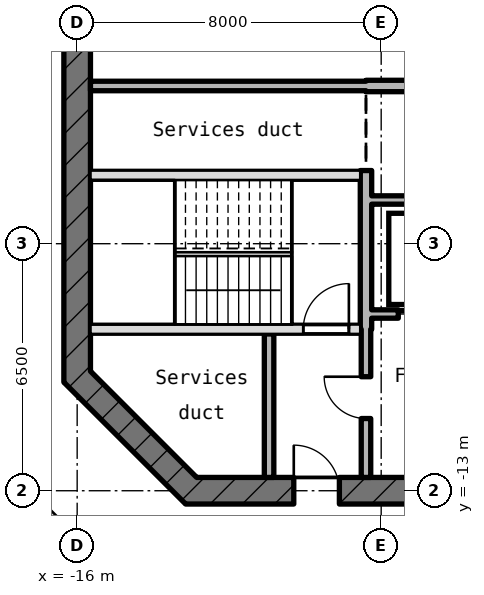
"""IFC4 building model, lengths in metres.
Left out: names, types, materials, properties, quantities, classifications, styles, units other than length and angle.
Written with IfcOpenShell. Run it as: python <this file> out.ifc"""

import sys

from ifc_helpers import new_model, si_unit, direction, frame, frame_2d, origin, place, context, subcontext, project, spatial, rectangle, extrude, element, fill, save


model = new_model("IFC4")
c1 = context("Model", 3, precision=1e-05, world=origin(), true_north=direction((0.0, 1.0)))
c2 = subcontext(c1, "Body", "Model", "MODEL_VIEW")
j1 = project(units=[si_unit("LENGTHUNIT", "METRE"), si_unit("PLANEANGLEUNIT", "RADIAN")], contexts=[c1])
p1 = place(None, origin())
s1 = spatial("IfcSite", under=j1, at=p1, CompositionType="ELEMENT")
p2 = place(p1, origin())
s2 = spatial("IfcBuilding", under=s1, at=p2, CompositionType="ELEMENT")
p3 = place(p2, frame((0.0, 0.0, 371.65)))
s3 = spatial("IfcBuildingStorey", under=s2, at=p3, CompositionType="ELEMENT", Elevation=371.65)
p4 = place(p3, frame((-16.0, 10.145, -0.18), z_axis=(0.0, 0.0, 1.0), x_axis=(0.0, -1.0, 0.0)))
e1 = element("IfcWall", 1, at=p4, inside=s3, PredefinedType="SHEAR", context=c2, shape_type="SweptSolid", body=[
    extrude(rectangle(XDim=20.29, YDim=0.7, at=frame_2d((10.145, 0.0))), origin(), (0.0, 0.0, 1.0), 4.15),
])
p5 = place(p4, frame((8.945, 0.0, 0.18)))
e2 = element("IfcOpeningElement", 2, at=p5, cuts=e1, PredefinedType="OPENING", context=c2, shape_type="SweptSolid", body=[
    extrude(rectangle(XDim=2.4, YDim=2.1, at=frame_2d((1.2, 1.05))), frame((0.0, 0.36, 0.0), z_axis=(0.0, -1.0, 0.0), x_axis=(1.0, 0.0, 0.0)), (0.0, 0.0, 1.0), 0.72),
])
p6 = place(p4, frame((5.545, 0.0, 0.18)))
e3 = element("IfcOpeningElement", 3, at=p6, cuts=e1, PredefinedType="OPENING", context=c2, shape_type="SweptSolid", body=[
    extrude(rectangle(XDim=1.2, YDim=2.1, at=frame_2d((0.6, 1.05))), frame((0.0, 0.36, 0.0), z_axis=(0.0, -1.0, 0.0), x_axis=(1.0, 0.0, 0.0)), (0.0, 0.0, 1.0), 0.72),
])
p7 = place(p3, frame((-16.103, -9.897, -0.18), z_axis=(0.0, 0.0, 1.0), x_axis=(0.707106781187, -0.707106781187, 0.0)))
e4 = element("IfcWall", 4, at=p7, inside=s3, PredefinedType="SHEAR", context=c2, shape_type="SweptSolid", body=[
    extrude(rectangle(XDim=4.533, YDim=0.7, at=frame_2d((2.266, 0.0))), origin(), (0.0, 0.0, 1.0), 4.15),
])
p8 = place(p3, frame((-13.145, -13.0, -0.18), z_axis=(0.0, 0.0, 1.0), x_axis=(1.0, 0.0, 0.0)))
e5 = element("IfcWall", 5, at=p8, inside=s3, PredefinedType="SHEAR", context=c2, shape_type="SweptSolid", body=[
    extrude(rectangle(XDim=26.29, YDim=0.7, at=frame_2d((13.145, 0.0))), origin(), (0.0, 0.0, 1.0), 4.15),
])
p9 = place(p8, frame((2.845, 0.0, 0.18)))
e6 = element("IfcOpeningElement", 6, at=p9, cuts=e5, PredefinedType="OPENING", context=c2, shape_type="SweptSolid", body=[
    extrude(rectangle(XDim=1.2, YDim=2.1, at=frame_2d((0.6, 1.05))), frame((0.0, 0.36, 0.0), z_axis=(0.0, -1.0, 0.0), x_axis=(1.0, 0.0, 0.0)), (0.0, 0.0, 1.0), 0.72),
])
p10 = place(p8, frame((6.845, 0.0, 0.18)))
e7 = element("IfcOpeningElement", 7, at=p10, cuts=e5, PredefinedType="OPENING", context=c2, shape_type="SweptSolid", body=[
    extrude(rectangle(XDim=1.4, YDim=2.1, at=frame_2d((0.7, 1.05))), frame((0.0, 0.36, 0.0), z_axis=(0.0, -1.0, 0.0), x_axis=(1.0, 0.0, 0.0)), (0.0, 0.0, 1.0), 0.72),
])
p11 = place(p8, frame((15.445, 0.0, 0.18)))
e8 = element("IfcOpeningElement", 8, at=p11, cuts=e5, PredefinedType="OPENING", context=c2, shape_type="SweptSolid", body=[
    extrude(rectangle(XDim=1.4, YDim=2.1, at=frame_2d((0.7, 1.05))), frame((0.0, 0.36, 0.0), z_axis=(0.0, -1.0, 0.0), x_axis=(1.0, 0.0, 0.0)), (0.0, 0.0, 1.0), 0.72),
])
p12 = place(p3, frame((-15.65, -8.75, -0.18), z_axis=(0.0, 0.0, 1.0), x_axis=(1.0, 0.0, 0.0)))
e9 = element("IfcWall", 9, at=p12, inside=s3, PredefinedType="SHEAR", context=c2, shape_type="SweptSolid", body=[
    extrude(rectangle(XDim=7.1, YDim=0.25, at=frame_2d((3.55, 0.0))), origin(), (0.0, 0.0, 1.0), 4.15),
])
p13 = place(p12, frame((5.6, 0.0, 0.18)))
e10 = element("IfcOpeningElement", 10, at=p13, cuts=e9, PredefinedType="OPENING", context=c2, shape_type="SweptSolid", body=[
    extrude(rectangle(XDim=1.2, YDim=2.1, at=frame_2d((0.6, 1.05))), frame((0.0, 0.135, 0.0), z_axis=(0.0, -1.0, 0.0), x_axis=(1.0, 0.0, 0.0)), (0.0, 0.0, 1.0), 0.27),
])
p14 = place(p3, frame((-8.25, -8.35, 0.0), z_axis=(0.0, 0.0, 1.0), x_axis=(1.0, 0.0, 0.0)))
e11 = element("IfcWall", 11, at=p14, inside=s3, PredefinedType="STANDARD", context=c2, shape_type="SweptSolid", body=[
    extrude(rectangle(XDim=5.34, YDim=0.22, at=frame_2d((2.67, 0.0))), origin(), (0.0, 0.0, 1.0), 3.97),
])
p15 = place(p14, frame((0.7, 0.0, 0.0)))
e12 = element("IfcOpeningElement", 12, at=p15, cuts=e11, PredefinedType="OPENING", context=c2, shape_type="SweptSolid", body=[
    extrude(rectangle(XDim=1.1, YDim=2.1, at=frame_2d((0.55, 1.05))), frame((0.0, 0.12, 0.0), z_axis=(0.0, -1.0, 0.0), x_axis=(1.0, 0.0, 0.0)), (0.0, 0.0, 1.0), 0.24),
])
p16 = place(p14, frame((3.5, 0.0, 0.0)))
e13 = element("IfcOpeningElement", 13, at=p16, cuts=e11, PredefinedType="OPENING", context=c2, shape_type="SweptSolid", body=[
    extrude(rectangle(XDim=1.1, YDim=2.1, at=frame_2d((0.55, 1.05))), frame((0.0, 0.12, 0.0), z_axis=(0.0, -1.0, 0.0), x_axis=(1.0, 0.0, 0.0)), (0.0, 0.0, 1.0), 0.24),
])
p17 = place(p3, frame((-8.25, -5.35, 0.0), z_axis=(0.0, 0.0, 1.0), x_axis=(1.0, 0.0, 0.0)))
e14 = element("IfcWall", 14, at=p17, inside=s3, PredefinedType="STANDARD", context=c2, shape_type="SweptSolid", body=[
    extrude(rectangle(XDim=16.5, YDim=0.22, at=frame_2d((8.25, 0.0))), origin(), (0.0, 0.0, 1.0), 3.97),
])
p18 = place(p3, frame((-15.65, -4.7, -0.18), z_axis=(0.0, 0.0, 1.0), x_axis=(1.0, 0.0, 0.0)))
e15 = element("IfcWall", 15, at=p18, inside=s3, PredefinedType="SHEAR", context=c2, shape_type="SweptSolid", body=[
    extrude(rectangle(XDim=7.1, YDim=0.25, at=frame_2d((3.55, 0.0))), origin(), (0.0, 0.0, 1.0), 4.15),
])
p19 = place(p3, frame((-15.65, -2.35, 0.0), z_axis=(0.0, 0.0, 1.0), x_axis=(1.0, 0.0, 0.0)))
e16 = element("IfcWall", 16, at=p19, inside=s3, PredefinedType="STANDARD", context=c2, shape_type="SweptSolid", body=[
    extrude(rectangle(XDim=7.25, YDim=0.25, at=frame_2d((3.625, 0.0))), origin(), (0.0, 0.0, 1.0), 3.97),
])
p20 = place(p3, frame((-8.4, -2.35, -0.18), z_axis=(0.0, 0.0, 1.0), x_axis=(1.0, 0.0, 0.0)))
e17 = element("IfcWall", 17, at=p20, inside=s3, PredefinedType="SHEAR", context=c2, shape_type="SweptSolid", body=[
    extrude(rectangle(XDim=16.8, YDim=0.3, at=frame_2d((8.4, 0.0))), origin(), (0.0, 0.0, 1.0), 4.15),
])
p21 = place(p20, frame((2.2, 0.0, 0.18)))
e18 = element("IfcOpeningElement", 18, at=p21, cuts=e17, PredefinedType="OPENING", context=c2, shape_type="SweptSolid", body=[
    extrude(rectangle(XDim=1.2, YDim=2.1, at=frame_2d((0.6, 1.05))), frame((0.0, 0.16, 0.0), z_axis=(0.0, -1.0, 0.0), x_axis=(1.0, 0.0, 0.0)), (0.0, 0.0, 1.0), 0.32),
])
p22 = place(p20, frame((5.0, 0.0, 0.18)))
e19 = element("IfcOpeningElement", 19, at=p22, cuts=e17, PredefinedType="OPENING", context=c2, shape_type="SweptSolid", body=[
    extrude(rectangle(XDim=1.2, YDim=2.1, at=frame_2d((0.6, 1.05))), frame((0.0, 0.16, 0.0), z_axis=(0.0, -1.0, 0.0), x_axis=(1.0, 0.0, 0.0)), (0.0, 0.0, 1.0), 0.32),
])
p23 = place(p20, frame((7.8, 0.0, 0.18)))
e20 = element("IfcOpeningElement", 20, at=p23, cuts=e17, PredefinedType="OPENING", context=c2, shape_type="SweptSolid", body=[
    extrude(rectangle(XDim=1.2, YDim=2.1, at=frame_2d((0.6, 1.05))), frame((0.0, 0.16, 0.0), z_axis=(0.0, -1.0, 0.0), x_axis=(1.0, 0.0, 0.0)), (0.0, 0.0, 1.0), 0.32),
])
p24 = place(p20, frame((10.6, 0.0, 0.18)))
e21 = element("IfcOpeningElement", 21, at=p24, cuts=e17, PredefinedType="OPENING", context=c2, shape_type="SweptSolid", body=[
    extrude(rectangle(XDim=1.2, YDim=2.1, at=frame_2d((0.6, 1.05))), frame((0.0, 0.16, 0.0), z_axis=(0.0, -1.0, 0.0), x_axis=(1.0, 0.0, 0.0)), (0.0, 0.0, 1.0), 0.32),
])
p25 = place(p20, frame((13.4, 0.0, 0.18)))
e22 = element("IfcOpeningElement", 22, at=p25, cuts=e17, PredefinedType="OPENING", context=c2, shape_type="SweptSolid", body=[
    extrude(rectangle(XDim=1.2, YDim=2.1, at=frame_2d((0.6, 1.05))), frame((0.0, 0.16, 0.0), z_axis=(0.0, -1.0, 0.0), x_axis=(1.0, 0.0, 0.0)), (0.0, 0.0, 1.0), 0.32),
])
p26 = place(p3, frame((-10.95, -12.65, 0.0), z_axis=(0.0, 0.0, 1.0), x_axis=(0.0, 1.0, 0.0)))
e23 = element("IfcWall", 23, at=p26, inside=s3, PredefinedType="STANDARD", context=c2, shape_type="SweptSolid", body=[
    extrude(rectangle(XDim=3.775, YDim=0.25, at=frame_2d((1.887, 0.0))), origin(), (0.0, 0.0, 1.0), 3.97),
])
p27 = place(p3, frame((-8.4, -12.65, 0.0), z_axis=(0.0, 0.0, 1.0), x_axis=(0.0, 1.0, 0.0)))
e24 = element("IfcWall", 24, at=p27, inside=s3, PredefinedType="STANDARD", context=c2, shape_type="SweptSolid", body=[
    extrude(rectangle(XDim=3.9, YDim=0.25, at=frame_2d((1.95, 0.0))), origin(), (0.0, 0.0, 1.0), 3.97),
])
p28 = place(p27, frame((1.55, 0.0, 0.0)))
e25 = element("IfcOpeningElement", 25, at=p28, cuts=e24, PredefinedType="OPENING", context=c2, shape_type="SweptSolid", body=[
    extrude(rectangle(XDim=1.1, YDim=2.1, at=frame_2d((0.55, 1.05))), frame((0.0, 0.135, 0.0), z_axis=(0.0, -1.0, 0.0), x_axis=(1.0, 0.0, 0.0)), (0.0, 0.0, 1.0), 0.27),
])
p29 = place(p3, frame((-8.4, -8.75, -0.18), z_axis=(0.0, 0.0, 1.0), x_axis=(0.0, 1.0, 0.0)))
e26 = element("IfcWall", 26, at=p29, inside=s3, PredefinedType="SHEAR", context=c2, shape_type="SweptSolid", body=[
    extrude(rectangle(XDim=4.175, YDim=0.3, at=frame_2d((2.087, 0.0))), origin(), (0.0, 0.0, 1.0), 4.15),
])
p30 = place(p3, frame((-15.993, -14.321, 0.0), z_axis=(0.0, 0.0, 1.0), x_axis=(-0.70707399087, 0.707139569983, 0.0)))
e27 = element("IfcWall", 27, at=p30, inside=s3, PredefinedType="PARTITIONING", context=c2, shape_type="SweptSolid", body=[
    extrude(rectangle(XDim=3.723, YDim=0.15, at=frame_2d((1.861, 0.0))), origin(), (0.0, 0.0, 1.0), 3.513),
])
p31 = place(p15, origin())
e28 = element("IfcDoor", 28, at=p31, inside=s3, OperationType="DOUBLE_DOOR_SLIDING", PredefinedType="DOOR", context=c2, shape_type="SweptSolid", body=[
    extrude(rectangle(XDim=1.1, YDim=2.1, at=frame_2d((0.55, 1.05))), frame((0.0, 0.025, 0.0), z_axis=(0.0, -1.0, 0.0), x_axis=(1.0, 0.0, 0.0)), (0.0, 0.0, 1.0), 0.05),
])
fill(e12, e28)
p32 = place(p13, origin())
e29 = element("IfcDoor", 29, at=p32, inside=s3, OperationType="SINGLE_SWING_RIGHT", PredefinedType="DOOR", context=c2, shape_type="SweptSolid", body=[
    extrude(rectangle(XDim=1.2, YDim=2.1, at=frame_2d((0.6, 1.05))), frame((0.0, 0.025, 0.0), z_axis=(0.0, -1.0, 0.0), x_axis=(1.0, 0.0, 0.0)), (0.0, 0.0, 1.0), 0.05),
])
fill(e10, e29)
p33 = place(p28, origin())
e30 = element("IfcDoor", 30, at=p33, inside=s3, OperationType="SINGLE_SWING_RIGHT", PredefinedType="DOOR", context=c2, shape_type="SweptSolid", body=[
    extrude(rectangle(XDim=1.1, YDim=2.1, at=frame_2d((0.55, 1.05))), frame((0.0, 0.025, 0.0), z_axis=(0.0, -1.0, 0.0), x_axis=(1.0, 0.0, 0.0)), (0.0, 0.0, 1.0), 0.05),
])
fill(e25, e30)
p34 = place(p9, origin())
e31 = element("IfcDoor", 31, at=p34, inside=s3, OperationType="SINGLE_SWING_RIGHT", PredefinedType="DOOR", context=c2, shape_type="SweptSolid", body=[
    extrude(rectangle(XDim=1.2, YDim=2.1, at=frame_2d((0.6, 1.05))), frame((0.0, 0.025, 0.0), z_axis=(0.0, -1.0, 0.0), x_axis=(1.0, 0.0, 0.0)), (0.0, 0.0, 1.0), 0.05),
])
fill(e6, e31)
save(model, sys.argv[1])
